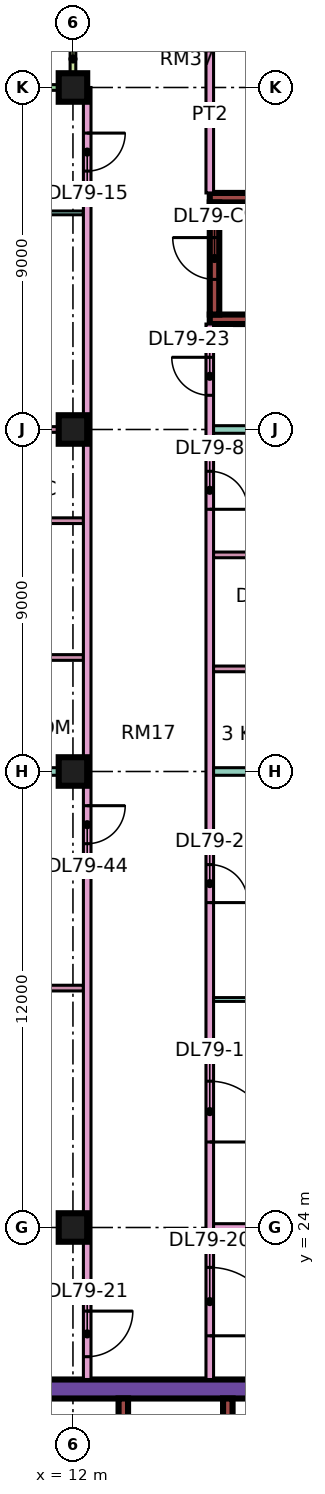
"""IFC4 building model, lengths in metres.
Left out: names, types, materials, properties, quantities, classifications, styles, units other than length and angle.
Written with IfcOpenShell. Run it as: python <this file> out.ifc"""

import sys

from ifc_helpers import new_model, si_unit, direction, frame, frame_2d, origin, origin_2d, place, context, subcontext, project, spatial, rectangle, extrude, element, fill, save


model = new_model("IFC4")
c1 = context("Model", 3, precision=1e-05, world=origin(), true_north=direction((0.0, 1.0)))
c2 = subcontext(c1, "Body", "Model", "MODEL_VIEW")
j1 = project(units=[si_unit("LENGTHUNIT", "METRE"), si_unit("PLANEANGLEUNIT", "RADIAN")], contexts=[c1])
p1 = place(None, origin())
s1 = spatial("IfcSite", under=j1, at=p1, CompositionType="ELEMENT")
p2 = place(p1, origin())
s2 = spatial("IfcBuilding", under=s1, at=p2, CompositionType="ELEMENT")
p3 = place(p2, frame((0.0, 0.0, 342.65)))
s3 = spatial("IfcBuildingStorey", under=s2, at=p3, CompositionType="ELEMENT", Elevation=342.65)
for number, where, z_axis, x_axis in (
    (1, (12.0, 24.0, 0.0), (0.0, 0.0, 1.0), (1.0, 0.0, 0.0)),
    (2, (12.0, 36.0, 0.0), (0.0, 0.0, 1.0), (1.0, 0.0, 0.0)),
    (3, (12.0, 45.0, 0.0), (0.0, 0.0, 1.0), (1.0, 0.0, 0.0)),
    (4, (12.0, 54.0, 0.0), (0.0, 0.0, 1.0), (1.0, 0.0, 0.0)),
):
    element("IfcColumn", number, at=place(p3, frame(where, z_axis=z_axis, x_axis=x_axis)), inside=s3, PredefinedType="COLUMN", context=c2, shape_type="SweptSolid", body=[
        extrude(rectangle(XDim=0.75, YDim=0.75, at=origin_2d()), origin(), (0.0, 0.0, 1.0), 3.75),
    ])
p4 = place(p3, frame((9.0, 19.75, 0.0), z_axis=(0.0, 0.0, 1.0), x_axis=(1.0, 0.0, 0.0)))
e5 = element("IfcWall", 5, at=p4, inside=s3, PredefinedType="SHEAR", context=c2, shape_type="SweptSolid", body=[
    extrude(rectangle(XDim=25.0, YDim=0.5, at=frame_2d((12.5, 0.0))), origin(), (0.0, 0.0, 1.0), 3.75),
])
p5 = place(p4, frame((19.1, 0.0, 0.0)))
e6 = element("IfcOpeningElement", 6, at=p5, cuts=e5, PredefinedType="OPENING", context=c2, shape_type="SweptSolid", body=[
    extrude(rectangle(XDim=1.8, YDim=2.4, at=frame_2d((0.9, 1.2))), frame((0.0, 0.26, 0.0), z_axis=(0.0, -1.0, 0.0), x_axis=(1.0, 0.0, 0.0)), (0.0, 0.0, 1.0), 0.52),
])
p6 = place(p3, frame((13.325, 7.5, 0.0), z_axis=(0.0, 0.0, 1.0), x_axis=(0.0, 1.0, 0.0)))
e7 = element("IfcWall", 7, at=p6, inside=s3, PredefinedType="SHEAR", context=c2, shape_type="SweptSolid", body=[
    extrude(rectangle(XDim=12.0, YDim=0.25, at=frame_2d((6.0, 0.0))), origin(), (0.0, 0.0, 1.0), 3.75),
])
p7 = place(p3, frame((16.075, 15.8, 0.0), z_axis=(0.0, 0.0, 1.0), x_axis=(0.0, 1.0, 0.0)))
e8 = element("IfcWall", 8, at=p7, inside=s3, PredefinedType="SHEAR", context=c2, shape_type="SweptSolid", body=[
    extrude(rectangle(XDim=3.7, YDim=0.25, at=frame_2d((1.85, 0.0))), origin(), (0.0, 0.0, 1.0), 3.75),
])
for number, where, z_axis, x_axis in (
    (9, (15.6, 47.9, 0.0), (0.0, 0.0, 1.0), (1.0, 0.0, 0.0)),
    (10, (15.6, 51.1, 0.0), (0.0, 0.0, 1.0), (1.0, 0.0, 0.0)),
):
    element("IfcWall", number, at=place(p3, frame(where, z_axis=z_axis, x_axis=x_axis)), inside=s3, PredefinedType="SHEAR", context=c2, shape_type="SweptSolid", body=[
        extrude(rectangle(XDim=7.0, YDim=0.25, at=frame_2d((3.5, 0.0))), origin(), (0.0, 0.0, 1.0), 3.75),
    ])
p8 = place(p3, frame((15.725, 48.025, 0.0), z_axis=(0.0, 0.0, 1.0), x_axis=(0.0, 1.0, 0.0)))
e11 = element("IfcWall", 11, at=p8, inside=s3, PredefinedType="SHEAR", context=c2, shape_type="SweptSolid", body=[
    extrude(rectangle(XDim=2.95, YDim=0.25, at=frame_2d((1.475, 0.0))), origin(), (0.0, 0.0, 1.0), 3.75),
])
p9 = place(p8, frame((0.925, 0.0, 0.0)))
e12 = element("IfcOpeningElement", 12, at=p9, cuts=e11, PredefinedType="OPENING", context=c2, shape_type="SweptSolid", body=[
    extrude(rectangle(XDim=1.1, YDim=2.2, at=frame_2d((0.55, 1.1))), frame((0.0, 0.135, 0.0), z_axis=(0.0, -1.0, 0.0), x_axis=(1.0, 0.0, 0.0)), (0.0, 0.0, 1.0), 0.27),
])
p10 = place(p3, frame((11.925, 54.0, 0.0), z_axis=(0.0, 0.0, 1.0), x_axis=(-1.0, 0.0, 0.0)))
e13 = element("IfcWall", 13, at=p10, inside=s3, PredefinedType="SOLIDWALL", context=c2, shape_type="SweptSolid", body=[
    extrude(rectangle(XDim=10.35, YDim=0.15, at=frame_2d((5.175, 0.0))), origin(), (0.0, 0.0, 1.0), 3.35),
])
p11 = place(p10, frame((2.075, 0.0, 0.0)))
e14 = element("IfcOpeningElement", 14, at=p11, cuts=e13, PredefinedType="OPENING", context=c2, shape_type="SweptSolid", body=[
    extrude(rectangle(XDim=1.8, YDim=2.4, at=frame_2d((0.9, 1.2))), frame((0.0, 0.085, 0.0), z_axis=(0.0, -1.0, 0.0), x_axis=(1.0, 0.0, 0.0)), (0.0, 0.0, 1.0), 0.17),
])
p12 = place(p10, frame((6.45, 0.0, 0.45)))
e15 = element("IfcOpeningElement", 15, at=p12, cuts=e13, PredefinedType="OPENING", context=c2, shape_type="SweptSolid", body=[
    extrude(rectangle(XDim=3.0, YDim=2.4, at=frame_2d((1.5, 1.2))), frame((0.0, 0.085, 0.0), z_axis=(0.0, -1.0, 0.0), x_axis=(1.0, 0.0, 0.0)), (0.0, 0.0, 1.0), 0.17),
])
p13 = place(p3, frame((12.0, 55.5, 0.0), z_axis=(0.0, 0.0, 1.0), x_axis=(0.0, -1.0, 0.0)))
e16 = element("IfcWall", 16, at=p13, inside=s3, PredefinedType="SOLIDWALL", context=c2, shape_type="SweptSolid", body=[
    extrude(rectangle(XDim=1.5, YDim=0.15, at=frame_2d((0.75, 0.0))), origin(), (0.0, 0.0, 1.0), 3.35),
])
p14 = place(p3, frame((-1.35, 22.4, 0.0), z_axis=(0.0, 0.0, 1.0), x_axis=(1.0, 0.0, 0.0)))
e17 = element("IfcWall", 17, at=p14, inside=s3, PredefinedType="PARTITIONING", context=c2, shape_type="SweptSolid", body=[
    extrude(rectangle(XDim=13.625, YDim=0.2, at=frame_2d((6.812, 0.0))), origin(), (0.0, 0.0, 1.0), 3.35),
])
p15 = place(p3, frame((0.0, 36.0, 0.0), z_axis=(0.0, 0.0, 1.0), x_axis=(1.0, 0.0, 0.0)))
e18 = element("IfcWall", 18, at=p15, inside=s3, PredefinedType="PARTITIONING", context=c2, shape_type="SweptSolid", body=[
    extrude(rectangle(XDim=12.275, YDim=0.2, at=frame_2d((6.137, 0.0))), origin(), (0.0, 0.0, 1.0), 3.35),
])
for number, where, z_axis, x_axis in (
    (19, (7.65, 30.3, 0.0), (0.0, 0.0, 1.0), (1.0, 0.0, 0.0)),
    (20, (7.65, 33.3, 0.0), (0.0, 0.0, 1.0), (1.0, 0.0, 0.0)),
    (21, (7.65, 39.0, 0.0), (0.0, 0.0, 1.0), (1.0, 0.0, 0.0)),
    (22, (7.65, 42.6, 0.0), (0.0, 0.0, 1.0), (1.0, 0.0, 0.0)),
    (23, (7.65, 45.0, 0.0), (0.0, 0.0, 1.0), (1.0, 0.0, 0.0)),
):
    element("IfcWall", number, at=place(p3, frame(where, z_axis=z_axis, x_axis=x_axis)), inside=s3, PredefinedType="PARTITIONING", context=c2, shape_type="SweptSolid", body=[
        extrude(rectangle(XDim=4.625, YDim=0.15, at=frame_2d((2.312, 0.0))), origin(), (0.0, 0.0, 1.0), 3.35),
    ])
p16 = place(p3, frame((7.65, 50.7, 0.0), z_axis=(0.0, 0.0, 1.0), x_axis=(1.0, 0.0, 0.0)))
e24 = element("IfcWall", 24, at=p16, inside=s3, PredefinedType="PARTITIONING", context=c2, shape_type="SweptSolid", body=[
    extrude(rectangle(XDim=4.625, YDim=0.1, at=frame_2d((2.312, 0.0))), origin(), (0.0, 0.0, 1.0), 3.35),
])
p17 = place(p16, frame((1.875, 0.0, 0.0)))
e25 = element("IfcOpeningElement", 25, at=p17, cuts=e24, PredefinedType="OPENING", context=c2, shape_type="SweptSolid", body=[
    extrude(rectangle(XDim=0.9, YDim=2.1, at=frame_2d((0.45, 1.05))), frame((0.0, 0.06, 0.0), z_axis=(0.0, -1.0, 0.0), x_axis=(1.0, 0.0, 0.0)), (0.0, 0.0, 1.0), 0.12),
])
p18 = place(p3, frame((12.375, 20.0, 0.0), z_axis=(0.0, 0.0, 1.0), x_axis=(0.0, 1.0, 0.0)))
e26 = element("IfcWall", 26, at=p18, inside=s3, PredefinedType="PARTITIONING", context=c2, shape_type="SweptSolid", body=[
    extrude(rectangle(XDim=34.0, YDim=0.2, at=frame_2d((17.0, 0.0))), origin(), (0.0, 0.0, 1.0), 3.35),
])
p19 = place(p18, frame((31.8, 0.0, 0.0)))
e27 = element("IfcOpeningElement", 27, at=p19, cuts=e26, PredefinedType="OPENING", context=c2, shape_type="SweptSolid", body=[
    extrude(rectangle(XDim=1.0, YDim=2.1, at=frame_2d((0.5, 1.05))), frame((0.0, 0.11, 0.0), z_axis=(0.0, -1.0, 0.0), x_axis=(1.0, 0.0, 0.0)), (0.0, 0.0, 1.0), 0.22),
])
p20 = place(p18, frame((0.6, 0.0, 0.0)))
e28 = element("IfcOpeningElement", 28, at=p20, cuts=e26, PredefinedType="OPENING", context=c2, shape_type="SweptSolid", body=[
    extrude(rectangle(XDim=1.2, YDim=2.1, at=frame_2d((0.6, 1.05))), frame((0.0, 0.11, 0.0), z_axis=(0.0, -1.0, 0.0), x_axis=(1.0, 0.0, 0.0)), (0.0, 0.0, 1.0), 0.22),
])
p21 = place(p18, frame((14.1, 0.0, 0.0)))
e29 = element("IfcOpeningElement", 29, at=p21, cuts=e26, PredefinedType="OPENING", context=c2, shape_type="SweptSolid", body=[
    extrude(rectangle(XDim=1.0, YDim=2.1, at=frame_2d((0.5, 1.05))), frame((0.0, 0.11, 0.0), z_axis=(0.0, -1.0, 0.0), x_axis=(1.0, 0.0, 0.0)), (0.0, 0.0, 1.0), 0.22),
])
p22 = place(p3, frame((15.6, 20.0, 0.0), z_axis=(0.0, 0.0, 1.0), x_axis=(0.0, 1.0, 0.0)))
e30 = element("IfcWall", 30, at=p22, inside=s3, PredefinedType="PARTITIONING", context=c2, shape_type="SweptSolid", body=[
    extrude(rectangle(XDim=27.775, YDim=0.2, at=frame_2d((13.887, 0.0))), origin(), (0.0, 0.0, 1.0), 3.35),
])
p23 = place(p22, frame((6.25, 0.0, 0.0)))
e31 = element("IfcOpeningElement", 31, at=p23, cuts=e30, PredefinedType="OPENING", context=c2, shape_type="SweptSolid", body=[
    extrude(rectangle(XDim=1.6, YDim=2.1, at=frame_2d((0.8, 1.05))), frame((0.0, 0.11, 0.0), z_axis=(0.0, -1.0, 0.0), x_axis=(1.0, 0.0, 0.0)), (0.0, 0.0, 1.0), 0.22),
])
p24 = place(p22, frame((12.55, 0.0, 0.0)))
e32 = element("IfcOpeningElement", 32, at=p24, cuts=e30, PredefinedType="OPENING", context=c2, shape_type="SweptSolid", body=[
    extrude(rectangle(XDim=1.0, YDim=2.1, at=frame_2d((0.5, 1.05))), frame((0.0, 0.11, 0.0), z_axis=(0.0, -1.0, 0.0), x_axis=(1.0, 0.0, 0.0)), (0.0, 0.0, 1.0), 0.22),
])
p25 = place(p22, frame((22.9, 0.0, 0.0)))
e33 = element("IfcOpeningElement", 33, at=p25, cuts=e30, PredefinedType="OPENING", context=c2, shape_type="SweptSolid", body=[
    extrude(rectangle(XDim=1.0, YDim=2.1, at=frame_2d((0.5, 1.05))), frame((0.0, 0.11, 0.0), z_axis=(0.0, -1.0, 0.0), x_axis=(1.0, 0.0, 0.0)), (0.0, 0.0, 1.0), 0.22),
])
p26 = place(p22, frame((1.15, 0.0, 0.0)))
e34 = element("IfcOpeningElement", 34, at=p26, cuts=e30, PredefinedType="OPENING", context=c2, shape_type="SweptSolid", body=[
    extrude(rectangle(XDim=1.8, YDim=2.1, at=frame_2d((0.9, 1.05))), frame((0.0, 0.11, 0.0), z_axis=(0.0, -1.0, 0.0), x_axis=(1.0, 0.0, 0.0)), (0.0, 0.0, 1.0), 0.22),
])
p27 = place(p22, frame((25.9, 0.0, 0.0)))
e35 = element("IfcOpeningElement", 35, at=p27, cuts=e30, PredefinedType="OPENING", context=c2, shape_type="SweptSolid", body=[
    extrude(rectangle(XDim=1.0, YDim=2.1, at=frame_2d((0.5, 1.05))), frame((0.0, 0.11, 0.0), z_axis=(0.0, -1.0, 0.0), x_axis=(1.0, 0.0, 0.0)), (0.0, 0.0, 1.0), 0.22),
])
p28 = place(p3, frame((15.6, 51.225, 0.0), z_axis=(0.0, 0.0, 1.0), x_axis=(0.0, 1.0, 0.0)))
e36 = element("IfcWall", 36, at=p28, inside=s3, PredefinedType="PARTITIONING", context=c2, shape_type="SweptSolid", body=[
    extrude(rectangle(XDim=4.125, YDim=0.2, at=frame_2d((2.062, 0.0))), origin(), (0.0, 0.0, 1.0), 3.35),
])
p29 = place(p3, frame((15.7, 24.0, 0.0), z_axis=(0.0, 0.0, 1.0), x_axis=(1.0, 0.0, 0.0)))
e37 = element("IfcWall", 37, at=p29, inside=s3, PredefinedType="PARTITIONING", context=c2, shape_type="SweptSolid", body=[
    extrude(rectangle(XDim=5.8, YDim=0.2, at=frame_2d((2.9, 0.0))), origin(), (0.0, 0.0, 1.0), 3.35),
])
p30 = place(p3, frame((15.7, 30.0, 0.0), z_axis=(0.0, 0.0, 1.0), x_axis=(1.0, 0.0, 0.0)))
e38 = element("IfcWall", 38, at=p30, inside=s3, PredefinedType="PARTITIONING", context=c2, shape_type="SweptSolid", body=[
    extrude(rectangle(XDim=5.8, YDim=0.1, at=frame_2d((2.9, 0.0))), origin(), (0.0, 0.0, 1.0), 3.35),
])
p31 = place(p3, frame((15.7, 36.0, 0.0), z_axis=(0.0, 0.0, 1.0), x_axis=(1.0, 0.0, 0.0)))
e39 = element("IfcWall", 39, at=p31, inside=s3, PredefinedType="PARTITIONING", context=c2, shape_type="SweptSolid", body=[
    extrude(rectangle(XDim=8.3, YDim=0.2, at=frame_2d((4.15, 0.0))), origin(), (0.0, 0.0, 1.0), 3.35),
])
p32 = place(p3, frame((15.7, 38.7, 0.0), z_axis=(0.0, 0.0, 1.0), x_axis=(1.0, 0.0, 0.0)))
e40 = element("IfcWall", 40, at=p32, inside=s3, PredefinedType="PARTITIONING", context=c2, shape_type="SweptSolid", body=[
    extrude(rectangle(XDim=3.125, YDim=0.15, at=frame_2d((1.562, 0.0))), origin(), (0.0, 0.0, 1.0), 3.35),
])
p33 = place(p3, frame((15.7, 41.7, 0.0), z_axis=(0.0, 0.0, 1.0), x_axis=(1.0, 0.0, 0.0)))
e41 = element("IfcWall", 41, at=p33, inside=s3, PredefinedType="PARTITIONING", context=c2, shape_type="SweptSolid", body=[
    extrude(rectangle(XDim=3.125, YDim=0.15, at=frame_2d((1.562, 0.0))), origin(), (0.0, 0.0, 1.0), 3.35),
])
p34 = place(p33, frame((1.1, 0.0, 0.0)))
e42 = element("IfcOpeningElement", 42, at=p34, cuts=e41, PredefinedType="OPENING", context=c2, shape_type="SweptSolid", body=[
    extrude(rectangle(XDim=0.8, YDim=2.1, at=frame_2d((0.4, 1.05))), frame((0.0, 0.085, 0.0), z_axis=(0.0, -1.0, 0.0), x_axis=(1.0, 0.0, 0.0)), (0.0, 0.0, 1.0), 0.17),
])
p35 = place(p3, frame((15.7, 45.0, 0.0), z_axis=(0.0, 0.0, 1.0), x_axis=(1.0, 0.0, 0.0)))
e43 = element("IfcWall", 43, at=p35, inside=s3, PredefinedType="PARTITIONING", context=c2, shape_type="SweptSolid", body=[
    extrude(rectangle(XDim=8.3, YDim=0.2, at=frame_2d((4.15, 0.0))), origin(), (0.0, 0.0, 1.0), 3.35),
])
p36 = place(p9, frame((1.1, 0.0, 0.0), z_axis=(0.0, 0.0, 1.0), x_axis=(-1.0, 0.0, 0.0)))
e44 = element("IfcDoor", 44, at=p36, inside=s3, OperationType="SINGLE_SWING_RIGHT", PredefinedType="DOOR", context=c2, shape_type="SweptSolid", body=[
    extrude(rectangle(XDim=1.1, YDim=2.2, at=frame_2d((0.55, 1.1))), frame((0.0, 0.025, 0.0), z_axis=(0.0, -1.0, 0.0), x_axis=(1.0, 0.0, 0.0)), (0.0, 0.0, 1.0), 0.05),
])
fill(e12, e44)
p37 = place(p23, frame((1.6, 0.0, 0.0), z_axis=(0.0, 0.0, 1.0), x_axis=(-1.0, 0.0, 0.0)))
e45 = element("IfcDoor", 45, at=p37, inside=s3, OperationType="DOUBLE_DOOR_SINGLE_SWING", PredefinedType="DOOR", context=c2, shape_type="SweptSolid", body=[
    extrude(rectangle(XDim=1.6, YDim=2.1, at=frame_2d((0.8, 1.05))), frame((0.0, 0.025, 0.0), z_axis=(0.0, -1.0, 0.0), x_axis=(1.0, 0.0, 0.0)), (0.0, 0.0, 1.0), 0.05),
])
fill(e31, e45)
p38 = place(p24, frame((1.0, 0.0, 0.0), z_axis=(0.0, 0.0, 1.0), x_axis=(-1.0, 0.0, 0.0)))
e46 = element("IfcDoor", 46, at=p38, inside=s3, OperationType="SINGLE_SWING_LEFT", PredefinedType="DOOR", context=c2, shape_type="SweptSolid", body=[
    extrude(rectangle(XDim=1.0, YDim=2.1, at=frame_2d((0.5, 1.05))), frame((0.0, 0.025, 0.0), z_axis=(0.0, -1.0, 0.0), x_axis=(1.0, 0.0, 0.0)), (0.0, 0.0, 1.0), 0.05),
])
fill(e32, e46)
p39 = place(p25, frame((1.0, 0.0, 0.0), z_axis=(0.0, 0.0, 1.0), x_axis=(-1.0, 0.0, 0.0)))
e47 = element("IfcDoor", 47, at=p39, inside=s3, OperationType="SINGLE_SWING_LEFT", PredefinedType="DOOR", context=c2, shape_type="SweptSolid", body=[
    extrude(rectangle(XDim=1.0, YDim=2.1, at=frame_2d((0.5, 1.05))), frame((0.0, 0.025, 0.0), z_axis=(0.0, -1.0, 0.0), x_axis=(1.0, 0.0, 0.0)), (0.0, 0.0, 1.0), 0.05),
])
fill(e33, e47)
p40 = place(p19, origin())
e48 = element("IfcDoor", 48, at=p40, inside=s3, OperationType="SINGLE_SWING_RIGHT", PredefinedType="DOOR", context=c2, shape_type="SweptSolid", body=[
    extrude(rectangle(XDim=1.0, YDim=2.1, at=frame_2d((0.5, 1.05))), frame((0.0, 0.025, 0.0), z_axis=(0.0, -1.0, 0.0), x_axis=(1.0, 0.0, 0.0)), (0.0, 0.0, 1.0), 0.05),
])
fill(e27, e48)
p41 = place(p26, frame((1.8, 0.0, 0.0), z_axis=(0.0, 0.0, 1.0), x_axis=(-1.0, 0.0, 0.0)))
e49 = element("IfcDoor", 49, at=p41, inside=s3, OperationType="DOUBLE_DOOR_SINGLE_SWING", PredefinedType="DOOR", context=c2, shape_type="SweptSolid", body=[
    extrude(rectangle(XDim=1.8, YDim=2.1, at=frame_2d((0.9, 1.05))), frame((0.0, 0.025, 0.0), z_axis=(0.0, -1.0, 0.0), x_axis=(1.0, 0.0, 0.0)), (0.0, 0.0, 1.0), 0.05),
])
fill(e34, e49)
p42 = place(p20, origin())
e50 = element("IfcDoor", 50, at=p42, inside=s3, OperationType="SINGLE_SWING_RIGHT", PredefinedType="DOOR", context=c2, shape_type="SweptSolid", body=[
    extrude(rectangle(XDim=1.2, YDim=2.1, at=frame_2d((0.6, 1.05))), frame((0.0, 0.025, 0.0), z_axis=(0.0, -1.0, 0.0), x_axis=(1.0, 0.0, 0.0)), (0.0, 0.0, 1.0), 0.05),
])
fill(e28, e50)
p43 = place(p27, frame((1.0, 0.0, 0.0), z_axis=(0.0, 0.0, 1.0), x_axis=(-1.0, 0.0, 0.0)))
e51 = element("IfcDoor", 51, at=p43, inside=s3, OperationType="SINGLE_SWING_RIGHT", PredefinedType="DOOR", context=c2, shape_type="SweptSolid", body=[
    extrude(rectangle(XDim=1.0, YDim=2.1, at=frame_2d((0.5, 1.05))), frame((0.0, 0.025, 0.0), z_axis=(0.0, -1.0, 0.0), x_axis=(1.0, 0.0, 0.0)), (0.0, 0.0, 1.0), 0.05),
])
fill(e35, e51)
p44 = place(p21, origin())
e52 = element("IfcDoor", 52, at=p44, inside=s3, OperationType="SINGLE_SWING_RIGHT", PredefinedType="DOOR", context=c2, shape_type="SweptSolid", body=[
    extrude(rectangle(XDim=1.0, YDim=2.1, at=frame_2d((0.5, 1.05))), frame((0.0, 0.025, 0.0), z_axis=(0.0, -1.0, 0.0), x_axis=(1.0, 0.0, 0.0)), (0.0, 0.0, 1.0), 0.05),
])
fill(e29, e52)
save(model, sys.argv[1])
